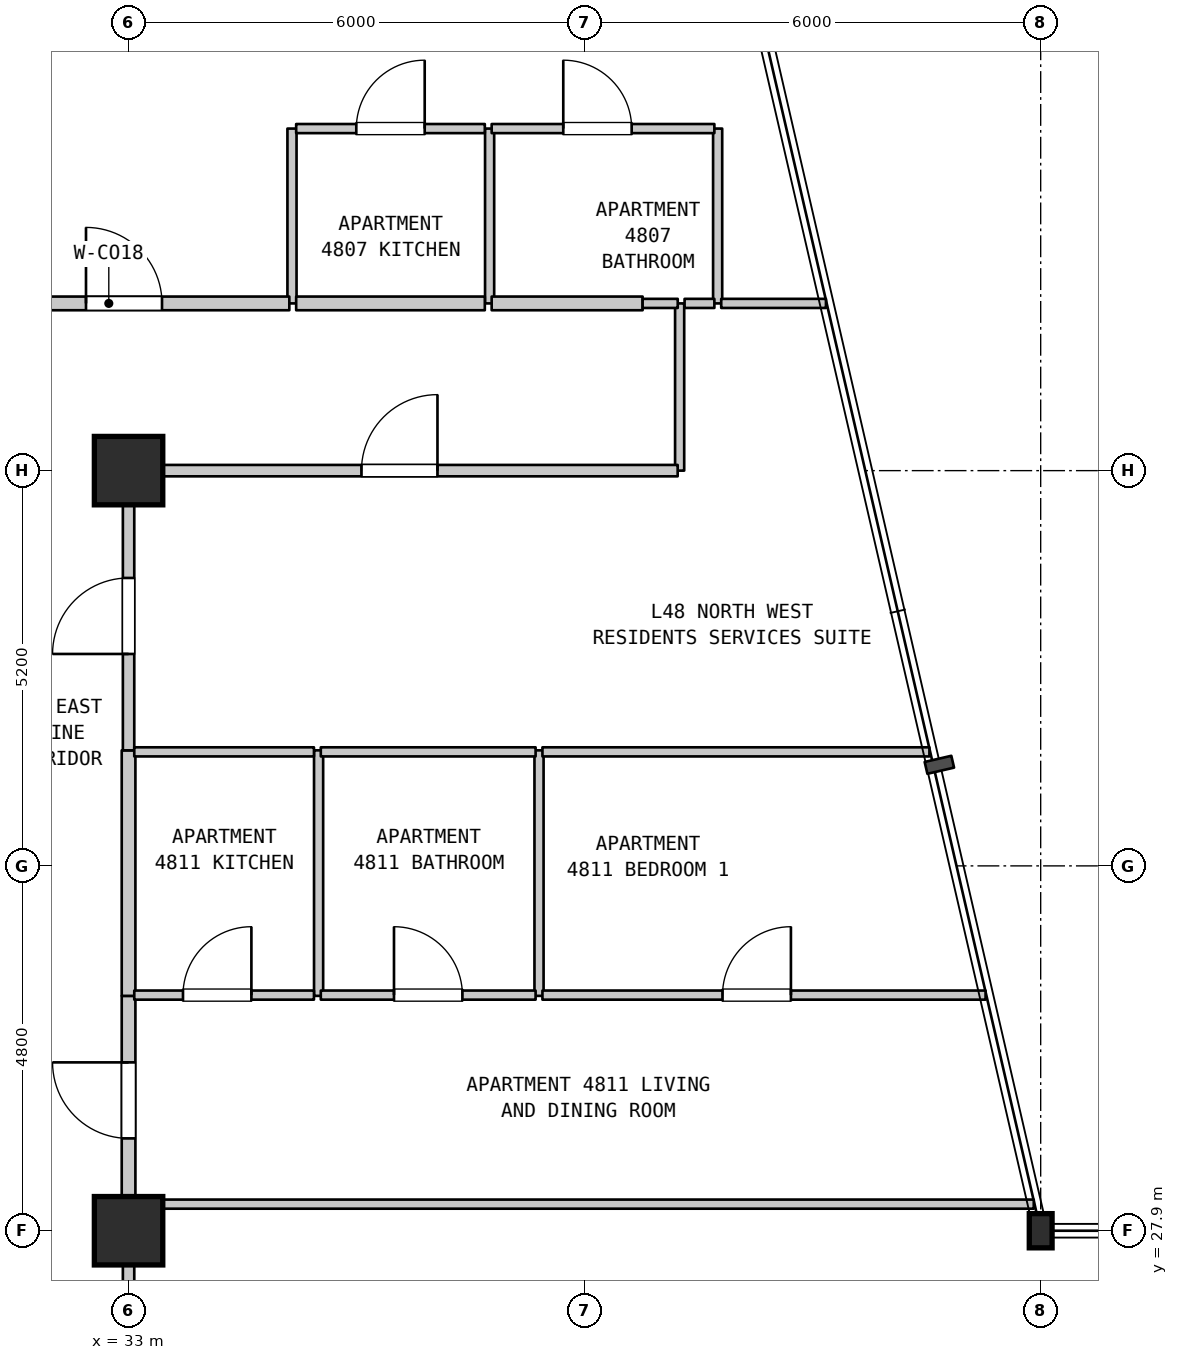
"""IFC4 building model, lengths in metres.
Left out: names, types, materials, properties, quantities, classifications, styles, units other than length and angle.
Written with IfcOpenShell. Run it as: python <this file> out.ifc"""

import sys

from ifc_helpers import new_model, si_unit, direction, frame, frame_2d, origin, origin_2d, place, context, subcontext, project, spatial, rectangle, i_section, extrude, element, fill, save


model = new_model("IFC4")
c1 = context("Model", 3, precision=1e-05, world=origin(), true_north=direction((0.0, 1.0)))
c2 = subcontext(c1, "Body", "Model", "MODEL_VIEW")
j1 = project(units=[si_unit("LENGTHUNIT", "METRE"), si_unit("PLANEANGLEUNIT", "RADIAN")], contexts=[c1])
p1 = place(None, origin())
s1 = spatial("IfcSite", under=j1, at=p1, CompositionType="ELEMENT")
p2 = place(p1, origin())
s2 = spatial("IfcBuilding", under=s1, at=p2, CompositionType="ELEMENT")
p3 = place(p2, frame((0.0, 0.0, 195.8)))
s3 = spatial("IfcBuildingStorey", under=s2, at=p3, CompositionType="ELEMENT", Elevation=195.8)
for number, where, z_axis, x_axis in (
    (1, (33.0, 27.9, 0.0), (0.0, 0.0, 1.0), (1.0, 0.0, 0.0)),
    (2, (33.0, 37.9, 0.0), (0.0, 0.0, 1.0), (1.0, 0.0, 0.0)),
):
    element("IfcColumn", number, at=place(p3, frame(where, z_axis=z_axis, x_axis=x_axis)), inside=s3, PredefinedType="COLUMN", context=c2, shape_type="SweptSolid", body=[
        extrude(rectangle(XDim=0.9, YDim=0.9, at=origin_2d()), origin(), (0.0, 0.0, 1.0), 3.7),
    ])
p4 = place(p3, frame((45.0, 27.9, 0.0), z_axis=(0.0, 0.0, 1.0), x_axis=(1.0, 0.0, 0.0)))
e3 = element("IfcColumn", 3, at=p4, inside=s3, PredefinedType="COLUMN", context=c2, shape_type="SweptSolid", body=[
    extrude(i_section(OverallWidth=0.3, OverallDepth=0.45, WebThickness=0.014, FlangeThickness=0.026, FilletRadius=0.027, at=origin_2d()), origin(), (0.0, 0.0, 1.0), 3.7),
])
p5 = place(p3, frame((33.0, 19.51, 0.0), z_axis=(0.0, 0.0, 1.0), x_axis=(0.0, 1.0, 0.0)))
e4 = element("IfcWall", 4, at=p5, inside=s3, PredefinedType="STANDARD", context=c2, shape_type="SweptSolid", body=[
    extrude(rectangle(XDim=8.72, YDim=0.15, at=frame_2d((4.36, 0.0))), origin(), (0.0, 0.0, 1.0), 2.99),
])
p6 = place(p5, frame((3.931, 0.0, 0.0)))
e5 = element("IfcOpeningElement", 5, at=p6, cuts=e4, PredefinedType="OPENING", context=c2, shape_type="SweptSolid", body=[
    extrude(rectangle(XDim=1.0, YDim=2.15, at=frame_2d((0.5, 1.075))), frame((0.0, 0.085, 0.0), z_axis=(0.0, -1.0, 0.0), x_axis=(1.0, 0.0, 0.0)), (0.0, 0.0, 1.0), 0.17),
])
p7 = place(p3, frame((33.0, 28.24, 0.0), z_axis=(0.0, 0.0, 1.0), x_axis=(0.0, 1.0, 0.0)))
e6 = element("IfcWall", 6, at=p7, inside=s3, PredefinedType="STANDARD", context=c2, shape_type="SweptSolid", body=[
    extrude(rectangle(XDim=2.75, YDim=0.18, at=frame_2d((1.375, 0.0))), origin(), (0.0, 0.0, 1.0), 2.89),
])
p8 = place(p7, frame((0.875, 0.0, 0.0)))
e7 = element("IfcOpeningElement", 7, at=p8, cuts=e6, PredefinedType="OPENING", context=c2, shape_type="SweptSolid", body=[
    extrude(rectangle(XDim=1.0, YDim=2.15, at=frame_2d((0.5, 1.075))), frame((0.0, 0.1, 0.0), z_axis=(0.0, -1.0, 0.0), x_axis=(1.0, 0.0, 0.0)), (0.0, 0.0, 1.0), 0.2),
])
p9 = place(p3, frame((33.0, 30.99, 0.0), z_axis=(0.0, 0.0, 1.0), x_axis=(0.0, 1.0, 0.0)))
e8 = element("IfcWall", 8, at=p9, inside=s3, PredefinedType="STANDARD", context=c2, shape_type="SweptSolid", body=[
    extrude(rectangle(XDim=3.23, YDim=0.18, at=frame_2d((1.615, 0.0))), origin(), (0.0, 0.0, 1.0), 2.89),
])
p10 = place(p3, frame((33.0, 34.22, 0.0), z_axis=(0.0, 0.0, 1.0), x_axis=(0.0, 1.0, 0.0)))
e9 = element("IfcWall", 9, at=p10, inside=s3, PredefinedType="STANDARD", context=c2, shape_type="SweptSolid", body=[
    extrude(rectangle(XDim=3.68, YDim=0.15, at=frame_2d((1.84, 0.0))), origin(), (0.0, 0.0, 1.0), 2.89),
])
p11 = place(p10, frame((1.268, 0.0, 0.0)))
e10 = element("IfcOpeningElement", 10, at=p11, cuts=e9, PredefinedType="OPENING", context=c2, shape_type="SweptSolid", body=[
    extrude(rectangle(XDim=1.0, YDim=2.15, at=frame_2d((0.5, 1.075))), frame((0.0, 0.085, 0.0), z_axis=(0.0, -1.0, 0.0), x_axis=(1.0, 0.0, 0.0)), (0.0, 0.0, 1.0), 0.17),
])
p12 = place(p3, frame((35.15, 40.1, 0.0), z_axis=(0.0, 0.0, 1.0), x_axis=(0.0, 1.0, 0.0)))
e11 = element("IfcWall", 11, at=p12, inside=s3, PredefinedType="PARTITIONING", context=c2, shape_type="SweptSolid", body=[
    extrude(rectangle(XDim=2.3, YDim=0.12, at=frame_2d((1.15, 0.0))), origin(), (0.0, 0.0, 1.0), 3.39),
])
p13 = place(p3, frame((35.5, 30.99, 0.0), z_axis=(0.0, 0.0, 1.0), x_axis=(0.0, 1.0, 0.0)))
e12 = element("IfcWall", 12, at=p13, inside=s3, PredefinedType="PARTITIONING", context=c2, shape_type="SweptSolid", body=[
    extrude(rectangle(XDim=3.23, YDim=0.12, at=frame_2d((1.615, 0.0))), origin(), (0.0, 0.0, 1.0), 3.39),
])
p14 = place(p3, frame((37.75, 40.1, 0.0), z_axis=(0.0, 0.0, 1.0), x_axis=(0.0, 1.0, 0.0)))
e13 = element("IfcWall", 13, at=p14, inside=s3, PredefinedType="PARTITIONING", context=c2, shape_type="SweptSolid", body=[
    extrude(rectangle(XDim=2.3, YDim=0.12, at=frame_2d((1.15, 0.0))), origin(), (0.0, 0.0, 1.0), 3.39),
])
p15 = place(p3, frame((38.4, 30.99, 0.0), z_axis=(0.0, 0.0, 1.0), x_axis=(0.0, 1.0, 0.0)))
e14 = element("IfcWall", 14, at=p15, inside=s3, PredefinedType="PARTITIONING", context=c2, shape_type="SweptSolid", body=[
    extrude(rectangle(XDim=3.23, YDim=0.12, at=frame_2d((1.615, 0.0))), origin(), (0.0, 0.0, 1.0), 3.39),
])
p16 = place(p3, frame((40.25, 37.9, 0.0), z_axis=(0.0, 0.0, 1.0), x_axis=(0.0, 1.0, 0.0)))
e15 = element("IfcWall", 15, at=p16, inside=s3, PredefinedType="PARTITIONING", context=c2, shape_type="SweptSolid", body=[
    extrude(rectangle(XDim=2.2, YDim=0.12, at=frame_2d((1.1, 0.0))), origin(), (0.0, 0.0, 1.0), 3.39),
])
p17 = place(p3, frame((40.75, 40.1, 0.0), z_axis=(0.0, 0.0, 1.0), x_axis=(0.0, 1.0, 0.0)))
e16 = element("IfcWall", 16, at=p17, inside=s3, PredefinedType="PARTITIONING", context=c2, shape_type="SweptSolid", body=[
    extrude(rectangle(XDim=2.3, YDim=0.12, at=frame_2d((1.15, 0.0))), origin(), (0.0, 0.0, 1.0), 3.39),
])
p18 = place(p3, frame((33.085, 28.25, 0.0), z_axis=(0.0, 0.0, 1.0), x_axis=(1.0, 0.0, 0.0)))
e17 = element("IfcWall", 17, at=p18, inside=s3, PredefinedType="PARTITIONING", context=c2, shape_type="SweptSolid", body=[
    extrude(rectangle(XDim=11.824, YDim=0.12, at=frame_2d((5.912, 0.0))), origin(), (0.0, 0.0, 1.0), 3.39),
])
p19 = place(p3, frame((33.075, 31.0, 0.0), z_axis=(0.0, 0.0, 1.0), x_axis=(1.0, 0.0, 0.0)))
e18 = element("IfcWall", 18, at=p19, inside=s3, PredefinedType="PARTITIONING", context=c2, shape_type="SweptSolid", body=[
    extrude(rectangle(XDim=2.364, YDim=0.12, at=frame_2d((1.182, 0.0))), origin(), (0.0, 0.0, 1.0), 3.39),
])
p20 = place(p19, frame((0.641, 0.0, 0.0)))
e19 = element("IfcOpeningElement", 19, at=p20, cuts=e18, PredefinedType="OPENING", context=c2, shape_type="SweptSolid", body=[
    extrude(rectangle(XDim=0.9, YDim=2.15, at=frame_2d((0.45, 1.075))), frame((0.0, 0.07, 0.0), z_axis=(0.0, -1.0, 0.0), x_axis=(1.0, 0.0, 0.0)), (0.0, 0.0, 1.0), 0.14),
])
p21 = place(p3, frame((35.529, 31.0, 0.0), z_axis=(0.0, 0.0, 1.0), x_axis=(1.0, 0.0, 0.0)))
e20 = element("IfcWall", 20, at=p21, inside=s3, PredefinedType="PARTITIONING", context=c2, shape_type="SweptSolid", body=[
    extrude(rectangle(XDim=2.826, YDim=0.12, at=frame_2d((1.413, 0.0))), origin(), (0.0, 0.0, 1.0), 3.39),
])
p22 = place(p21, frame((0.963, 0.0, 0.0)))
e21 = element("IfcOpeningElement", 21, at=p22, cuts=e20, PredefinedType="OPENING", context=c2, shape_type="SweptSolid", body=[
    extrude(rectangle(XDim=0.9, YDim=2.1, at=frame_2d((0.45, 1.05))), frame((0.0, 0.07, 0.0), z_axis=(0.0, -1.0, 0.0), x_axis=(1.0, 0.0, 0.0)), (0.0, 0.0, 1.0), 0.14),
])
p23 = place(p3, frame((38.445, 31.0, 0.0), z_axis=(0.0, 0.0, 1.0), x_axis=(1.0, 0.0, 0.0)))
e22 = element("IfcWall", 22, at=p23, inside=s3, PredefinedType="PARTITIONING", context=c2, shape_type="SweptSolid", body=[
    extrude(rectangle(XDim=5.83, YDim=0.12, at=frame_2d((2.915, 0.0))), origin(), (0.0, 0.0, 1.0), 3.39),
])
p24 = place(p23, frame((2.369, 0.0, 0.0)))
e23 = element("IfcOpeningElement", 23, at=p24, cuts=e22, PredefinedType="OPENING", context=c2, shape_type="SweptSolid", body=[
    extrude(rectangle(XDim=0.9, YDim=2.15, at=frame_2d((0.45, 1.075))), frame((0.0, 0.07, 0.0), z_axis=(0.0, -1.0, 0.0), x_axis=(1.0, 0.0, 0.0)), (0.0, 0.0, 1.0), 0.14),
])
p25 = place(p3, frame((33.075, 34.2, 0.0), z_axis=(0.0, 0.0, 1.0), x_axis=(1.0, 0.0, 0.0)))
e24 = element("IfcWall", 24, at=p25, inside=s3, PredefinedType="PARTITIONING", context=c2, shape_type="SweptSolid", body=[
    extrude(rectangle(XDim=2.364, YDim=0.12, at=frame_2d((1.182, 0.0))), origin(), (0.0, 0.0, 1.0), 3.39),
])
p26 = place(p3, frame((35.529, 34.2, 0.0), z_axis=(0.0, 0.0, 1.0), x_axis=(1.0, 0.0, 0.0)))
e25 = element("IfcWall", 25, at=p26, inside=s3, PredefinedType="PARTITIONING", context=c2, shape_type="SweptSolid", body=[
    extrude(rectangle(XDim=2.826, YDim=0.12, at=frame_2d((1.413, 0.0))), origin(), (0.0, 0.0, 1.0), 3.39),
])
p27 = place(p3, frame((38.445, 34.2, 0.0), z_axis=(0.0, 0.0, 1.0), x_axis=(1.0, 0.0, 0.0)))
e26 = element("IfcWall", 26, at=p27, inside=s3, PredefinedType="PARTITIONING", context=c2, shape_type="SweptSolid", body=[
    extrude(rectangle(XDim=5.091, YDim=0.12, at=frame_2d((2.545, 0.0))), origin(), (0.0, 0.0, 1.0), 3.39),
])
p28 = place(p3, frame((33.06, 37.9, 0.0), z_axis=(0.0, 0.0, 1.0), x_axis=(1.0, 0.0, 0.0)))
e27 = element("IfcWall", 27, at=p28, inside=s3, PredefinedType="STANDARD", context=c2, shape_type="SweptSolid", body=[
    extrude(rectangle(XDim=7.164, YDim=0.15, at=frame_2d((3.582, 0.0))), origin(), (0.0, 0.0, 1.0), 3.39),
])
p29 = place(p28, frame((3.004, 0.0, 0.0)))
e28 = element("IfcOpeningElement", 28, at=p29, cuts=e27, PredefinedType="OPENING", context=c2, shape_type="SweptSolid", body=[
    extrude(rectangle(XDim=1.0, YDim=2.15, at=frame_2d((0.5, 1.075))), frame((0.0, 0.085, 0.0), z_axis=(0.0, -1.0, 0.0), x_axis=(1.0, 0.0, 0.0)), (0.0, 0.0, 1.0), 0.17),
])
p30 = place(p3, frame((30.365, 40.1, 0.0), z_axis=(0.0, 0.0, 1.0), x_axis=(1.0, 0.0, 0.0)))
e29 = element("IfcWall", 29, at=p30, inside=s3, PredefinedType="STANDARD", context=c2, shape_type="SweptSolid", body=[
    extrude(rectangle(XDim=4.75, YDim=0.18, at=frame_2d((2.375, 0.0))), origin(), (0.0, 0.0, 1.0), 3.39),
])
p31 = place(p30, frame((2.075, 0.0, 0.0)))
e30 = element("IfcOpeningElement", 30, at=p31, cuts=e29, PredefinedType="OPENING", context=c2, shape_type="SweptSolid", body=[
    extrude(rectangle(XDim=1.0, YDim=2.15, at=frame_2d((0.5, 1.075))), frame((0.0, 0.1, 0.0), z_axis=(0.0, -1.0, 0.0), x_axis=(1.0, 0.0, 0.0)), (0.0, 0.0, 1.0), 0.2),
])
p32 = place(p3, frame((35.205, 40.1, 0.0), z_axis=(0.0, 0.0, 1.0), x_axis=(1.0, 0.0, 0.0)))
e31 = element("IfcWall", 31, at=p32, inside=s3, PredefinedType="STANDARD", context=c2, shape_type="SweptSolid", body=[
    extrude(rectangle(XDim=2.482, YDim=0.18, at=frame_2d((1.241, 0.0))), origin(), (0.0, 0.0, 1.0), 3.39),
])
p33 = place(p3, frame((37.777, 40.1, 0.0), z_axis=(0.0, 0.0, 1.0), x_axis=(1.0, 0.0, 0.0)))
e32 = element("IfcWall", 32, at=p33, inside=s3, PredefinedType="STANDARD", context=c2, shape_type="SweptSolid", body=[
    extrude(rectangle(XDim=1.986, YDim=0.18, at=frame_2d((0.993, 0.0))), origin(), (0.0, 0.0, 1.0), 3.39),
])
p34 = place(p3, frame((39.763, 40.1, 0.0), z_axis=(0.0, 0.0, 1.0), x_axis=(1.0, 0.0, 0.0)))
e33 = element("IfcWall", 33, at=p34, inside=s3, PredefinedType="PARTITIONING", context=c2, shape_type="SweptSolid", body=[
    extrude(rectangle(XDim=0.462, YDim=0.12, at=frame_2d((0.231, 0.0))), origin(), (0.0, 0.0, 1.0), 3.39),
])
p35 = place(p3, frame((40.315, 40.1, 0.0), z_axis=(0.0, 0.0, 1.0), x_axis=(1.0, 0.0, 0.0)))
e34 = element("IfcWall", 34, at=p35, inside=s3, PredefinedType="PARTITIONING", context=c2, shape_type="SweptSolid", body=[
    extrude(rectangle(XDim=0.392, YDim=0.12, at=frame_2d((0.196, 0.0))), origin(), (0.0, 0.0, 1.0), 3.39),
])
p36 = place(p3, frame((40.797, 40.1, 0.0), z_axis=(0.0, 0.0, 1.0), x_axis=(1.0, 0.0, 0.0)))
e35 = element("IfcWall", 35, at=p36, inside=s3, PredefinedType="PARTITIONING", context=c2, shape_type="SweptSolid", body=[
    extrude(rectangle(XDim=1.378, YDim=0.12, at=frame_2d((0.689, 0.0))), origin(), (0.0, 0.0, 1.0), 3.39),
])
p37 = place(p3, frame((35.205, 42.4, 0.0), z_axis=(0.0, 0.0, 1.0), x_axis=(1.0, 0.0, 0.0)))
e36 = element("IfcWall", 36, at=p37, inside=s3, PredefinedType="PARTITIONING", context=c2, shape_type="SweptSolid", body=[
    extrude(rectangle(XDim=2.482, YDim=0.12, at=frame_2d((1.241, 0.0))), origin(), (0.0, 0.0, 1.0), 3.39),
])
p38 = place(p37, frame((0.791, 0.0, 0.0)))
e37 = element("IfcOpeningElement", 37, at=p38, cuts=e36, PredefinedType="OPENING", context=c2, shape_type="SweptSolid", body=[
    extrude(rectangle(XDim=0.9, YDim=2.15, at=frame_2d((0.45, 1.075))), frame((0.0, 0.07, 0.0), z_axis=(0.0, -1.0, 0.0), x_axis=(1.0, 0.0, 0.0)), (0.0, 0.0, 1.0), 0.14),
])
p39 = place(p3, frame((37.777, 42.4, 0.0), z_axis=(0.0, 0.0, 1.0), x_axis=(1.0, 0.0, 0.0)))
e38 = element("IfcWall", 38, at=p39, inside=s3, PredefinedType="PARTITIONING", context=c2, shape_type="SweptSolid", body=[
    extrude(rectangle(XDim=2.93, YDim=0.12, at=frame_2d((1.465, 0.0))), origin(), (0.0, 0.0, 1.0), 3.39),
])
p40 = place(p39, frame((0.942, 0.0, 0.0)))
e39 = element("IfcOpeningElement", 39, at=p40, cuts=e38, PredefinedType="OPENING", context=c2, shape_type="SweptSolid", body=[
    extrude(rectangle(XDim=0.9, YDim=2.1, at=frame_2d((0.45, 1.05))), frame((0.0, 0.07, 0.0), z_axis=(0.0, -1.0, 0.0), x_axis=(1.0, 0.0, 0.0)), (0.0, 0.0, 1.0), 0.14),
])
p41 = place(p8, origin())
e40 = element("IfcDoor", 40, at=p41, inside=s3, OperationType="SINGLE_SWING_RIGHT", PredefinedType="DOOR", context=c2, shape_type="SweptSolid", body=[
    extrude(rectangle(XDim=1.0, YDim=2.15, at=frame_2d((0.5, 1.075))), frame((0.0, 0.025, 0.0), z_axis=(0.0, -1.0, 0.0), x_axis=(1.0, 0.0, 0.0)), (0.0, 0.0, 1.0), 0.05),
])
fill(e7, e40)
p42 = place(p11, origin())
e41 = element("IfcDoor", 41, at=p42, inside=s3, OperationType="SINGLE_SWING_LEFT", PredefinedType="DOOR", context=c2, shape_type="SweptSolid", body=[
    extrude(rectangle(XDim=1.0, YDim=2.15, at=frame_2d((0.5, 1.075))), frame((0.0, 0.025, 0.0), z_axis=(0.0, -1.0, 0.0), x_axis=(1.0, 0.0, 0.0)), (0.0, 0.0, 1.0), 0.05),
])
fill(e10, e41)
p43 = place(p20, origin())
e42 = element("IfcDoor", 42, at=p43, inside=s3, OperationType="SINGLE_SWING_RIGHT", PredefinedType="DOOR", context=c2, shape_type="SweptSolid", body=[
    extrude(rectangle(XDim=0.9, YDim=2.15, at=frame_2d((0.45, 1.075))), frame((0.0, 0.025, 0.0), z_axis=(0.0, -1.0, 0.0), x_axis=(1.0, 0.0, 0.0)), (0.0, 0.0, 1.0), 0.05),
])
fill(e19, e42)
p44 = place(p22, origin())
e43 = element("IfcDoor", 43, at=p44, inside=s3, OperationType="SINGLE_SWING_LEFT", PredefinedType="DOOR", context=c2, shape_type="SweptSolid", body=[
    extrude(rectangle(XDim=0.9, YDim=2.1, at=frame_2d((0.45, 1.05))), frame((0.0, 0.025, 0.0), z_axis=(0.0, -1.0, 0.0), x_axis=(1.0, 0.0, 0.0)), (0.0, 0.0, 1.0), 0.05),
])
fill(e21, e43)
p45 = place(p24, origin())
e44 = element("IfcDoor", 44, at=p45, inside=s3, OperationType="SINGLE_SWING_RIGHT", PredefinedType="DOOR", context=c2, shape_type="SweptSolid", body=[
    extrude(rectangle(XDim=0.9, YDim=2.15, at=frame_2d((0.45, 1.075))), frame((0.0, 0.025, 0.0), z_axis=(0.0, -1.0, 0.0), x_axis=(1.0, 0.0, 0.0)), (0.0, 0.0, 1.0), 0.05),
])
fill(e23, e44)
p46 = place(p29, origin())
e45 = element("IfcDoor", 45, at=p46, inside=s3, OperationType="SINGLE_SWING_RIGHT", PredefinedType="DOOR", context=c2, shape_type="SweptSolid", body=[
    extrude(rectangle(XDim=1.0, YDim=2.15, at=frame_2d((0.5, 1.075))), frame((0.0, 0.025, 0.0), z_axis=(0.0, -1.0, 0.0), x_axis=(1.0, 0.0, 0.0)), (0.0, 0.0, 1.0), 0.05),
])
fill(e28, e45)
p47 = place(p31, origin())
e46 = element("IfcDoor", 46, at=p47, inside=s3, OperationType="SINGLE_SWING_LEFT", PredefinedType="DOOR", context=c2, shape_type="SweptSolid", body=[
    extrude(rectangle(XDim=1.0, YDim=2.15, at=frame_2d((0.5, 1.075))), frame((0.0, 0.025, 0.0), z_axis=(0.0, -1.0, 0.0), x_axis=(1.0, 0.0, 0.0)), (0.0, 0.0, 1.0), 0.05),
])
fill(e30, e46)
p48 = place(p38, origin())
e47 = element("IfcDoor", 47, at=p48, inside=s3, OperationType="SINGLE_SWING_RIGHT", PredefinedType="DOOR", context=c2, shape_type="SweptSolid", body=[
    extrude(rectangle(XDim=0.9, YDim=2.15, at=frame_2d((0.45, 1.075))), frame((0.0, 0.025, 0.0), z_axis=(0.0, -1.0, 0.0), x_axis=(1.0, 0.0, 0.0)), (0.0, 0.0, 1.0), 0.05),
])
fill(e37, e47)
p49 = place(p40, origin())
e48 = element("IfcDoor", 48, at=p49, inside=s3, OperationType="SINGLE_SWING_LEFT", PredefinedType="DOOR", context=c2, shape_type="SweptSolid", body=[
    extrude(rectangle(XDim=0.9, YDim=2.1, at=frame_2d((0.45, 1.05))), frame((0.0, 0.025, 0.0), z_axis=(0.0, -1.0, 0.0), x_axis=(1.0, 0.0, 0.0)), (0.0, 0.0, 1.0), 0.05),
])
fill(e39, e48)
save(model, sys.argv[1])
